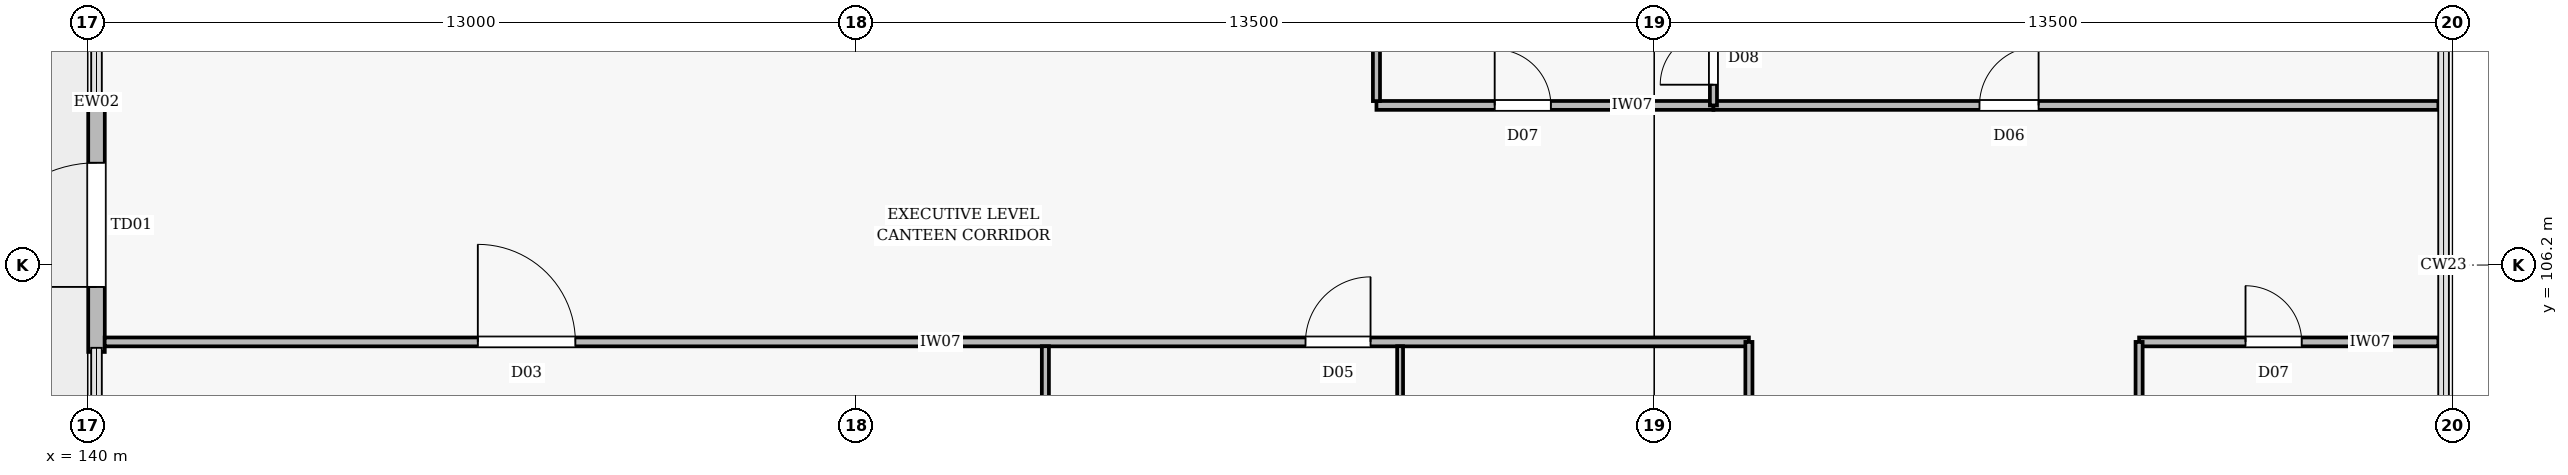
"""IFC4 building model, lengths in metres.
Left out: names, types, materials, properties, quantities, classifications, styles, units other than length and angle.
Written with IfcOpenShell. Run it as: python <this file> out.ifc"""

import sys

from ifc_helpers import new_model, si_unit, direction, frame, frame_2d, origin, place, context, subcontext, project, spatial, rectangle, extrude, element, fill, save


model = new_model("IFC4")
c1 = context("Model", 3, precision=1e-05, world=origin(), true_north=direction((0.0, 1.0)))
c2 = subcontext(c1, "Body", "Model", "MODEL_VIEW")
j1 = project(units=[si_unit("LENGTHUNIT", "METRE"), si_unit("PLANEANGLEUNIT", "RADIAN")], contexts=[c1])
p1 = place(None, origin())
s1 = spatial("IfcSite", under=j1, at=p1, CompositionType="ELEMENT")
p2 = place(p1, origin())
s2 = spatial("IfcBuilding", under=s1, at=p2, CompositionType="ELEMENT")
p3 = place(p2, frame((0.0, 0.0, 25.2)))
s3 = spatial("IfcBuildingStorey", under=s2, at=p3, CompositionType="ELEMENT", Elevation=25.2)
p4 = place(p3, frame((140.15, 104.73, 0.0), z_axis=(0.0, 0.0, 1.0), x_axis=(0.0, 1.0, 0.0)))
e1 = element("IfcWall", 1, at=p4, inside=s3, PredefinedType="STANDARD", context=c2, shape_type="SweptSolid", body=[
    extrude(rectangle(XDim=4.34, YDim=0.28, at=frame_2d((2.17, 0.0))), origin(), (0.0, 0.0, 1.0), 4.65),
])
p5 = place(p4, frame((1.1, 0.0, 0.005)))
e2 = element("IfcOpeningElement", 2, at=p5, cuts=e1, PredefinedType="OPENING", context=c2, shape_type="SweptSolid", body=[
    extrude(rectangle(XDim=2.1, YDim=2.3, at=frame_2d((1.05, 1.15))), frame((0.0, 0.152, 0.0), z_axis=(0.0, -1.0, 0.0), x_axis=(1.0, 0.0, 0.0)), (0.0, 0.0, 1.0), 0.304),
])
p6 = place(p3, frame((140.288, 104.9, 0.0), z_axis=(0.0, 0.0, 1.0), x_axis=(1.0, 0.0, 0.0)))
e3 = element("IfcWall", 3, at=p6, inside=s3, PredefinedType="PARTITIONING", context=c2, shape_type="SweptSolid", body=[
    extrude(rectangle(XDim=27.812, YDim=0.15, at=frame_2d((13.906, 0.0))), origin(), (0.0, 0.0, 1.0), 4.87),
])
p7 = place(p6, frame((6.312, 0.0, 0.005)))
e4 = element("IfcOpeningElement", 4, at=p7, cuts=e3, PredefinedType="OPENING", context=c2, shape_type="SweptSolid", body=[
    extrude(rectangle(XDim=1.65, YDim=2.2, at=frame_2d((0.825, 1.1))), frame((0.0, 0.087, 0.0), z_axis=(0.0, -1.0, 0.0), x_axis=(1.0, 0.0, 0.0)), (0.0, 0.0, 1.0), 0.174),
])
p8 = place(p6, frame((20.312, 0.0, 0.005)))
e5 = element("IfcOpeningElement", 5, at=p8, cuts=e3, PredefinedType="OPENING", context=c2, shape_type="SweptSolid", body=[
    extrude(rectangle(XDim=1.1, YDim=2.1, at=frame_2d((0.55, 1.05))), frame((0.0, 0.087, 0.0), z_axis=(0.0, -1.0, 0.0), x_axis=(1.0, 0.0, 0.0)), (0.0, 0.0, 1.0), 0.174),
])
p9 = place(p3, frame((174.7, 104.9, 0.0), z_axis=(0.0, 0.0, 1.0), x_axis=(1.0, 0.0, 0.0)))
e6 = element("IfcWall", 6, at=p9, inside=s3, PredefinedType="PARTITIONING", context=c2, shape_type="SweptSolid", body=[
    extrude(rectangle(XDim=5.062, YDim=0.15, at=frame_2d((2.531, 0.0))), origin(), (0.0, 0.0, 1.0), 4.87),
])
p10 = place(p9, frame((1.8, 0.0, 0.005)))
e7 = element("IfcOpeningElement", 7, at=p10, cuts=e6, PredefinedType="OPENING", context=c2, shape_type="SweptSolid", body=[
    extrude(rectangle(XDim=0.95, YDim=2.1, at=frame_2d((0.475, 1.05))), frame((0.0, 0.087, 0.0), z_axis=(0.0, -1.0, 0.0), x_axis=(1.0, 0.0, 0.0)), (0.0, 0.0, 1.0), 0.174),
])
p11 = place(p3, frame((156.2, 90.308, 0.0), z_axis=(0.0, 0.0, 1.0), x_axis=(0.0, 1.0, 0.0)))
e8 = element("IfcWall", 8, at=p11, inside=s3, PredefinedType="PARTITIONING", context=c2, shape_type="SweptSolid", body=[
    extrude(rectangle(XDim=14.519, YDim=0.12, at=frame_2d((7.259, 0.0))), origin(), (0.0, 0.0, 1.0), 4.68),
])
p12 = place(p3, frame((168.1, 89.7, 0.0), z_axis=(0.0, 0.0, 1.0), x_axis=(0.0, 1.0, 0.0)))
e9 = element("IfcWall", 9, at=p12, inside=s3, PredefinedType="PARTITIONING", context=c2, shape_type="SweptSolid", body=[
    extrude(rectangle(XDim=15.2, YDim=0.12, at=frame_2d((7.6, 0.0))), origin(), (0.0, 0.0, 1.0), 4.68),
])
p13 = place(p12, frame((6.0, 0.0, 0.005)))
e10 = element("IfcOpeningElement", 10, at=p13, cuts=e9, PredefinedType="OPENING", context=c2, shape_type="SweptSolid", body=[
    extrude(rectangle(XDim=0.95, YDim=2.1, at=frame_2d((0.475, 1.05))), frame((0.0, 0.072, 0.0), z_axis=(0.0, -1.0, 0.0), x_axis=(1.0, 0.0, 0.0)), (0.0, 0.0, 1.0), 0.144),
])
p14 = place(p3, frame((174.7, 89.7, 0.0), z_axis=(0.0, 0.0, 1.0), x_axis=(0.0, 1.0, 0.0)))
e11 = element("IfcWall", 11, at=p14, inside=s3, PredefinedType="PARTITIONING", context=c2, shape_type="SweptSolid", body=[
    extrude(rectangle(XDim=15.2, YDim=0.12, at=frame_2d((7.6, 0.0))), origin(), (0.0, 0.0, 1.0), 4.68),
])
p15 = place(p14, frame((6.0, 0.0, 0.005)))
e12 = element("IfcOpeningElement", 12, at=p15, cuts=e11, PredefinedType="OPENING", context=c2, shape_type="SweptSolid", body=[
    extrude(rectangle(XDim=0.95, YDim=2.1, at=frame_2d((0.475, 1.05))), frame((0.0, 0.072, 0.0), z_axis=(0.0, -1.0, 0.0), x_axis=(1.0, 0.0, 0.0)), (0.0, 0.0, 1.0), 0.144),
])
p16 = place(p3, frame((161.8, 108.9, 0.0), z_axis=(0.0, 0.0, 1.0), x_axis=(1.0, 0.0, 0.0)))
e13 = element("IfcWall", 13, at=p16, inside=s3, PredefinedType="PARTITIONING", context=c2, shape_type="SweptSolid", body=[
    extrude(rectangle(XDim=5.7, YDim=0.15, at=frame_2d((2.85, 0.0))), origin(), (0.0, 0.0, 1.0), 4.87),
])
p17 = place(p16, frame((2.0, 0.0, 0.005)))
e14 = element("IfcOpeningElement", 14, at=p17, cuts=e13, PredefinedType="OPENING", context=c2, shape_type="SweptSolid", body=[
    extrude(rectangle(XDim=0.95, YDim=2.1, at=frame_2d((0.475, 1.05))), frame((0.0, 0.087, 0.0), z_axis=(0.0, -1.0, 0.0), x_axis=(1.0, 0.0, 0.0)), (0.0, 0.0, 1.0), 0.174),
])
p18 = place(p3, frame((167.5, 108.9, 0.0), z_axis=(0.0, 0.0, 1.0), x_axis=(1.0, 0.0, 0.0)))
e15 = element("IfcWall", 15, at=p18, inside=s3, PredefinedType="PARTITIONING", context=c2, shape_type="SweptSolid", body=[
    extrude(rectangle(XDim=12.262, YDim=0.15, at=frame_2d((6.131, 0.0))), origin(), (0.0, 0.0, 1.0), 4.87),
])
p19 = place(p18, frame((4.5, 0.0, 0.005)))
e16 = element("IfcOpeningElement", 16, at=p19, cuts=e15, PredefinedType="OPENING", context=c2, shape_type="SweptSolid", body=[
    extrude(rectangle(XDim=1.0, YDim=2.1, at=frame_2d((0.5, 1.05))), frame((0.0, 0.087, 0.0), z_axis=(0.0, -1.0, 0.0), x_axis=(1.0, 0.0, 0.0)), (0.0, 0.0, 1.0), 0.174),
])
p20 = place(p3, frame((167.5, 108.9, 0.0), z_axis=(0.0, 0.0, 1.0), x_axis=(0.0, 1.0, 0.0)))
e17 = element("IfcWall", 17, at=p20, inside=s3, PredefinedType="PARTITIONING", context=c2, shape_type="SweptSolid", body=[
    extrude(rectangle(XDim=6.2, YDim=0.12, at=frame_2d((3.1, 0.0))), origin(), (0.0, 0.0, 1.0), 4.68),
])
p21 = place(p20, frame((0.35, 0.0, 0.005)))
e18 = element("IfcOpeningElement", 18, at=p21, cuts=e17, PredefinedType="OPENING", context=c2, shape_type="SweptSolid", body=[
    extrude(rectangle(XDim=0.9, YDim=2.1, at=frame_2d((0.45, 1.05))), frame((0.0, 0.072, 0.0), z_axis=(0.0, -1.0, 0.0), x_axis=(1.0, 0.0, 0.0)), (0.0, 0.0, 1.0), 0.144),
])
p22 = place(p3, frame((161.8, 108.973, 0.0), z_axis=(0.0, 0.0, 1.0), x_axis=(0.0, 1.0, 0.0)))
e19 = element("IfcWall", 19, at=p22, inside=s3, PredefinedType="PARTITIONING", context=c2, shape_type="SweptSolid", body=[
    extrude(rectangle(XDim=13.189, YDim=0.12, at=frame_2d((6.595, 0.0))), origin(), (0.0, 0.0, 1.0), 4.68),
])
p23 = place(p3, frame((162.2, 90.308, 0.0), z_axis=(0.0, 0.0, 1.0), x_axis=(0.0, 1.0, 0.0)))
e20 = element("IfcWall", 20, at=p23, inside=s3, PredefinedType="MOVABLE", context=c2, shape_type="SweptSolid", body=[
    extrude(rectangle(XDim=14.519, YDim=0.1, at=frame_2d((7.259, 0.0))), origin(), (0.0, 0.0, 1.0), 4.68),
])
p24 = place(p5, origin())
e21 = element("IfcDoor", 21, at=p24, inside=s3, OperationType="SINGLE_SWING_LEFT", PredefinedType="DOOR", context=c2, shape_type="SweptSolid", body=[
    extrude(rectangle(XDim=2.1, YDim=2.3, at=frame_2d((1.05, 1.15))), frame((0.0, 0.025, 0.0), z_axis=(0.0, -1.0, 0.0), x_axis=(1.0, 0.0, 0.0)), (0.0, 0.0, 1.0), 0.05),
])
fill(e2, e21)
p25 = place(p7, origin())
e22 = element("IfcDoor", 22, at=p25, inside=s3, OperationType="DOUBLE_DOOR_SINGLE_SWING", PredefinedType="DOOR", context=c2, shape_type="SweptSolid", body=[
    extrude(rectangle(XDim=1.65, YDim=2.2, at=frame_2d((0.825, 1.1))), frame((0.0, 0.025, 0.0), z_axis=(0.0, -1.0, 0.0), x_axis=(1.0, 0.0, 0.0)), (0.0, 0.0, 1.0), 0.05),
])
fill(e4, e22)
p26 = place(p8, origin())
e23 = element("IfcDoor", 23, at=p26, inside=s3, OperationType="SINGLE_SWING_RIGHT", PredefinedType="DOOR", context=c2, shape_type="SweptSolid", body=[
    extrude(rectangle(XDim=1.1, YDim=2.1, at=frame_2d((0.55, 1.05))), frame((0.0, 0.025, 0.0), z_axis=(0.0, -1.0, 0.0), x_axis=(1.0, 0.0, 0.0)), (0.0, 0.0, 1.0), 0.05),
])
fill(e5, e23)
p27 = place(p10, origin())
e24 = element("IfcDoor", 24, at=p27, inside=s3, OperationType="SINGLE_SWING_LEFT", PredefinedType="DOOR", context=c2, shape_type="SweptSolid", body=[
    extrude(rectangle(XDim=0.95, YDim=2.1, at=frame_2d((0.475, 1.05))), frame((0.0, 0.025, 0.0), z_axis=(0.0, -1.0, 0.0), x_axis=(1.0, 0.0, 0.0)), (0.0, 0.0, 1.0), 0.05),
])
fill(e7, e24)
p28 = place(p17, origin())
e25 = element("IfcDoor", 25, at=p28, inside=s3, OperationType="SINGLE_SWING_LEFT", PredefinedType="DOOR", context=c2, shape_type="SweptSolid", body=[
    extrude(rectangle(XDim=0.95, YDim=2.1, at=frame_2d((0.475, 1.05))), frame((0.0, 0.025, 0.0), z_axis=(0.0, -1.0, 0.0), x_axis=(1.0, 0.0, 0.0)), (0.0, 0.0, 1.0), 0.05),
])
fill(e14, e25)
p29 = place(p19, origin())
e26 = element("IfcDoor", 26, at=p29, inside=s3, OperationType="SINGLE_SWING_RIGHT", PredefinedType="DOOR", context=c2, shape_type="SweptSolid", body=[
    extrude(rectangle(XDim=1.0, YDim=2.1, at=frame_2d((0.5, 1.05))), frame((0.0, 0.025, 0.0), z_axis=(0.0, -1.0, 0.0), x_axis=(1.0, 0.0, 0.0)), (0.0, 0.0, 1.0), 0.05),
])
fill(e16, e26)
p30 = place(p21, origin())
e27 = element("IfcDoor", 27, at=p30, inside=s3, OperationType="SINGLE_SWING_LEFT", PredefinedType="DOOR", context=c2, shape_type="SweptSolid", body=[
    extrude(rectangle(XDim=0.9, YDim=2.1, at=frame_2d((0.45, 1.05))), frame((0.0, 0.025, 0.0), z_axis=(0.0, -1.0, 0.0), x_axis=(1.0, 0.0, 0.0)), (0.0, 0.0, 1.0), 0.05),
])
fill(e18, e27)
save(model, sys.argv[1])
